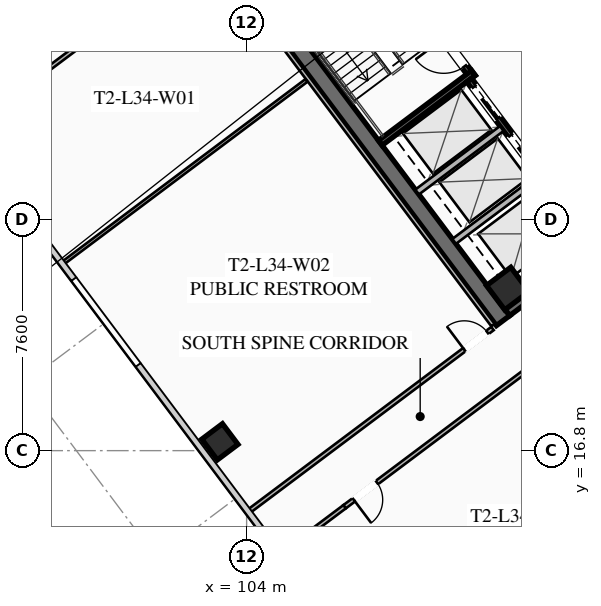
"""IFC4 building model, lengths in metres.
Left out: names, types, materials, properties, quantities, classifications, styles, units other than length and angle.
Written with IfcOpenShell. Run it as: python <this file> out.ifc"""

import sys

from ifc_helpers import new_model, si_unit, direction, frame, frame_2d, origin, origin_2d, place, context, subcontext, project, spatial, rectangle, hollow_rectangle, extrude, element, fill, save


model = new_model("IFC4")
c1 = context("Model", 3, precision=1e-05, world=origin(), true_north=direction((0.0, 1.0)))
c2 = subcontext(c1, "Body", "Model", "MODEL_VIEW")
j1 = project(units=[si_unit("LENGTHUNIT", "METRE"), si_unit("PLANEANGLEUNIT", "RADIAN")], contexts=[c1])
p1 = place(None, origin())
s1 = spatial("IfcSite", under=j1, at=p1, CompositionType="ELEMENT")
p2 = place(p1, origin())
s2 = spatial("IfcBuilding", under=s1, at=p2, CompositionType="ELEMENT")
p3 = place(p2, frame((0.0, 0.0, 128.6)))
s3 = spatial("IfcBuildingStorey", under=s2, at=p3, CompositionType="ELEMENT", Elevation=128.6)
p4 = place(p3, frame((112.436, 21.077, 0.0), z_axis=(0.0, 0.0, 1.0), x_axis=(-0.600005007985, 0.799996243986, 0.0)))
e1 = element("IfcWall", 1, at=p4, inside=s3, PredefinedType="SHEAR", context=c2, shape_type="SweptSolid", body=[
    extrude(rectangle(XDim=15.6, YDim=0.55, at=frame_2d((7.8, 0.0))), origin(), (0.0, 0.0, 1.0), 3.55),
])
p5 = place(p3, frame((124.539, 30.498, 0.0), z_axis=(0.0, 0.0, 1.0), x_axis=(-0.799998054672, -0.600002593761, 0.0)))
e2 = element("IfcWall", 2, at=p5, inside=s3, PredefinedType="SHEAR", context=c2, shape_type="SweptSolid", body=[
    extrude(rectangle(XDim=15.06, YDim=0.55, at=frame_2d((7.53, 0.0))), origin(), (0.0, 0.0, 1.0), 3.55),
])
p6 = place(p5, frame((9.23, 0.0, 0.0)))
e3 = element("IfcOpeningElement", 3, at=p6, cuts=e2, PredefinedType="OPENING", context=c2, shape_type="SweptSolid", body=[
    extrude(rectangle(XDim=1.25, YDim=2.25, at=frame_2d((0.625, 1.125))), frame((0.0, 0.285, 0.0), z_axis=(0.0, -1.0, 0.0), x_axis=(1.0, 0.0, 0.0)), (0.0, 0.0, 1.0), 0.57),
])
p7 = place(p5, frame((4.18, 0.0, 0.0)))
e4 = element("IfcOpeningElement", 4, at=p7, cuts=e2, PredefinedType="OPENING", context=c2, shape_type="SweptSolid", body=[
    extrude(rectangle(XDim=1.25, YDim=2.25, at=frame_2d((0.625, 1.125))), frame((0.0, 0.285, 0.0), z_axis=(0.0, -1.0, 0.0), x_axis=(1.0, 0.0, 0.0)), (0.0, 0.0, 1.0), 0.57),
])
p8 = place(p3, frame((112.59, 22.13, 0.0), z_axis=(0.0, 0.0, 1.0), x_axis=(0.799999996291, 0.600000004945, 0.0)))
e5 = element("IfcColumn", 5, at=p8, inside=s3, PredefinedType="COLUMN", context=c2, shape_type="SweptSolid", body=[
    extrude(hollow_rectangle(XDim=1.0, YDim=1.0, WallThickness=0.04, at=origin_2d()), origin(), (0.0, 0.0, 1.0), 3.37),
])
p9 = place(p3, frame((103.12, 17.09, 0.0), z_axis=(0.0, 0.0, 1.0), x_axis=(0.799999996291, 0.600000004945, 0.0)))
e6 = element("IfcColumn", 6, at=p9, inside=s3, PredefinedType="COLUMN", context=c2, shape_type="SweptSolid", body=[
    extrude(hollow_rectangle(XDim=0.85, YDim=0.85, WallThickness=0.035, at=origin_2d()), origin(), (0.0, 0.0, 1.0), 3.37),
])
p10 = place(p3, frame((111.44, 29.08, 0.0), z_axis=(0.0, 0.0, 1.0), x_axis=(-0.59999029481, 0.8000072788, 0.0)))
e7 = element("IfcWall", 7, at=p10, inside=s3, PredefinedType="SHEAR", context=c2, shape_type="SweptSolid", body=[
    extrude(rectangle(XDim=8.05, YDim=0.2, at=frame_2d((4.025, 0.0))), origin(), (0.0, 0.0, 1.0), 3.37),
])
p11 = place(p10, frame((0.45, 0.0, 0.0)))
e8 = element("IfcOpeningElement", 8, at=p11, cuts=e7, PredefinedType="OPENING", context=c2, shape_type="SweptSolid", body=[
    extrude(rectangle(XDim=1.15, YDim=2.2, at=frame_2d((0.575, 1.1))), frame((0.0, 0.11, 0.0), z_axis=(0.0, -1.0, 0.0), x_axis=(1.0, 0.0, 0.0)), (0.0, 0.0, 1.0), 0.22),
])
p12 = place(p3, frame((108.396, 26.922, 0.0), z_axis=(0.0, 0.0, 1.0), x_axis=(0.800015298837, 0.599979601008, 0.0)))
e9 = element("IfcWall", 9, at=p12, inside=s3, PredefinedType="SHEAR", context=c2, shape_type="SweptSolid", body=[
    extrude(rectangle(XDim=3.83, YDim=0.2, at=frame_2d((1.915, 0.0))), origin(), (0.0, 0.0, 1.0), 3.37),
])
p13 = place(p3, frame((117.998, 25.936, 0.0), z_axis=(0.0, 0.0, 1.0), x_axis=(-0.600002693989, 0.799997979501, 0.0)))
e10 = element("IfcWall", 10, at=p13, inside=s3, PredefinedType="SHEAR", context=c2, shape_type="SweptSolid", body=[
    extrude(rectangle(XDim=14.5, YDim=0.2, at=frame_2d((7.25, 0.0))), origin(), (0.0, 0.0, 1.0), 3.37),
])
p14 = place(p3, frame((115.19, 23.83, 0.0), z_axis=(0.0, 0.0, 1.0), x_axis=(-0.599993943644, 0.800004542231, 0.0)))
e11 = element("IfcWall", 11, at=p14, inside=s3, PredefinedType="SHEAR", context=c2, shape_type="SweptSolid", body=[
    extrude(rectangle(XDim=6.45, YDim=0.2, at=frame_2d((3.225, 0.0))), origin(), (0.0, 0.0, 1.0), 3.37),
])
p15 = place(p14, frame((4.875, 0.0, 0.0)))
e12 = element("IfcOpeningElement", 12, at=p15, cuts=e11, PredefinedType="OPENING", context=c2, shape_type="SweptSolid", body=[
    extrude(rectangle(XDim=1.3, YDim=2.25, at=frame_2d((0.65, 1.125))), frame((0.0, 0.11, 0.0), z_axis=(0.0, -1.0, 0.0), x_axis=(1.0, 0.0, 0.0)), (0.0, 0.0, 1.0), 0.22),
])
p16 = place(p14, frame((2.875, 0.0, 0.0)))
e13 = element("IfcOpeningElement", 13, at=p16, cuts=e11, PredefinedType="OPENING", context=c2, shape_type="SweptSolid", body=[
    extrude(rectangle(XDim=1.3, YDim=2.25, at=frame_2d((0.65, 1.125))), frame((0.0, 0.11, 0.0), z_axis=(0.0, -1.0, 0.0), x_axis=(1.0, 0.0, 0.0)), (0.0, 0.0, 1.0), 0.22),
])
p17 = place(p14, frame((0.675, 0.0, 0.0)))
e14 = element("IfcOpeningElement", 14, at=p17, cuts=e11, PredefinedType="OPENING", context=c2, shape_type="SweptSolid", body=[
    extrude(rectangle(XDim=1.3, YDim=2.25, at=frame_2d((0.65, 1.125))), frame((0.0, 0.11, 0.0), z_axis=(0.0, -1.0, 0.0), x_axis=(1.0, 0.0, 0.0)), (0.0, 0.0, 1.0), 0.22),
])
for number, where, z_axis, x_axis in (
    (15, (110.826, 23.682, 0.0), (0.0, 0.0, 1.0), (0.8, 0.6, 0.0)),
    (16, (109.608, 25.306, 0.0), (0.0, 0.0, 1.0), (0.8, 0.6, 0.0)),
):
    element("IfcWall", number, at=place(p3, frame(where, z_axis=z_axis, x_axis=x_axis)), inside=s3, PredefinedType="SOLIDWALL", context=c2, shape_type="SweptSolid", body=[
        extrude(rectangle(XDim=3.48, YDim=0.2, at=frame_2d((1.74, 0.0))), origin(), (0.0, 0.0, 1.0), 3.37),
    ])
p18 = place(p3, frame((132.262, 33.734, 0.0), z_axis=(0.0, 0.0, 1.0), x_axis=(-0.800003744006, -0.59999500796, 0.0)))
e17 = element("IfcWall", 17, at=p18, inside=s3, PredefinedType="PARTITIONING", context=c2, shape_type="SweptSolid", body=[
    extrude(rectangle(XDim=31.3, YDim=0.135, at=frame_2d((15.65, 0.0))), origin(), (0.0, 0.0, 1.0), 2.723),
])
p19 = place(p18, frame((29.97, 0.0, 0.0)))
e18 = element("IfcOpeningElement", 18, at=p19, cuts=e17, PredefinedType="OPENING", context=c2, shape_type="SweptSolid", body=[
    extrude(rectangle(XDim=0.95, YDim=2.05, at=frame_2d((0.475, 1.025))), frame((0.0, 0.077, 0.0), z_axis=(0.0, -1.0, 0.0), x_axis=(1.0, 0.0, 0.0)), (0.0, 0.0, 1.0), 0.155),
])
p20 = place(p18, frame((15.43, 0.0, 0.0)))
e19 = element("IfcOpeningElement", 19, at=p20, cuts=e17, PredefinedType="OPENING", context=c2, shape_type="SweptSolid", body=[
    extrude(rectangle(XDim=0.95, YDim=2.05, at=frame_2d((0.475, 1.025))), frame((0.0, 0.077, 0.0), z_axis=(0.0, -1.0, 0.0), x_axis=(1.0, 0.0, 0.0)), (0.0, 0.0, 1.0), 0.155),
])
p21 = place(p18, frame((11.146, 0.0, 0.0)))
e20 = element("IfcOpeningElement", 20, at=p21, cuts=e17, PredefinedType="OPENING", context=c2, shape_type="SweptSolid", body=[
    extrude(rectangle(XDim=0.95, YDim=2.05, at=frame_2d((0.475, 1.025))), frame((0.0, 0.077, 0.0), z_axis=(0.0, -1.0, 0.0), x_axis=(1.0, 0.0, 0.0)), (0.0, 0.0, 1.0), 0.155),
])
p22 = place(p18, frame((0.38, 0.0, 0.0)))
e21 = element("IfcOpeningElement", 21, at=p22, cuts=e17, PredefinedType="OPENING", context=c2, shape_type="SweptSolid", body=[
    extrude(rectangle(XDim=0.95, YDim=2.05, at=frame_2d((0.475, 1.025))), frame((0.0, 0.077, 0.0), z_axis=(0.0, -1.0, 0.0), x_axis=(1.0, 0.0, 0.0)), (0.0, 0.0, 1.0), 0.155),
])
p23 = place(p3, frame((105.118, 13.376, 0.0), z_axis=(0.0, 0.0, 1.0), x_axis=(0.799977721118, 0.600029704027, 0.0)))
e22 = element("IfcWall", 22, at=p23, inside=s3, PredefinedType="PARTITIONING", context=c2, shape_type="SweptSolid", body=[
    extrude(rectangle(XDim=2.63, YDim=0.135, at=frame_2d((1.315, 0.0))), origin(), (0.0, 0.0, 1.0), 2.723),
])
p24 = place(p3, frame((112.104, 20.928, 0.0), z_axis=(0.0, 0.0, 1.0), x_axis=(-0.599994940075, 0.800003794918, 0.0)))
e23 = element("IfcWall", 23, at=p24, inside=s3, PredefinedType="PARTITIONING", context=c2, shape_type="SweptSolid", body=[
    extrude(rectangle(XDim=15.44, YDim=0.135, at=frame_2d((7.72, 0.0))), origin(), (0.0, 0.0, 1.0), 2.723),
])
p25 = place(p3, frame((102.728, 33.296, 0.0), z_axis=(0.0, 0.0, 1.0), x_axis=(-0.800002918023, -0.599996109283, 0.0)))
e24 = element("IfcWall", 24, at=p25, inside=s3, PredefinedType="PARTITIONING", context=c2, shape_type="SweptSolid", body=[
    extrude(rectangle(XDim=10.04, YDim=0.135, at=frame_2d((5.02, 0.0))), origin(), (0.0, 0.0, 1.0), 2.723),
])
p26 = place(p25, frame((0.5, 0.0, 0.0)))
e25 = element("IfcOpeningElement", 25, at=p26, cuts=e24, PredefinedType="OPENING", context=c2, shape_type="SweptSolid", body=[
    extrude(rectangle(XDim=0.95, YDim=2.05, at=frame_2d((0.475, 1.025))), frame((0.0, 0.077, 0.0), z_axis=(0.0, -1.0, 0.0), x_axis=(1.0, 0.0, 0.0)), (0.0, 0.0, 1.0), 0.155),
])
p27 = place(p3, frame((104.056, 14.792, 0.0), z_axis=(0.0, 0.0, 1.0), x_axis=(0.800002918023, 0.599996109283, 0.0)))
e26 = element("IfcWall", 26, at=p27, inside=s3, PredefinedType="PARTITIONING", context=c2, shape_type="SweptSolid", body=[
    extrude(rectangle(XDim=10.04, YDim=0.135, at=frame_2d((5.02, 0.0))), origin(), (0.0, 0.0, 1.0), 2.723),
])
p28 = place(p27, frame((8.88, 0.0, 0.0)))
e27 = element("IfcOpeningElement", 27, at=p28, cuts=e26, PredefinedType="OPENING", context=c2, shape_type="SweptSolid", body=[
    extrude(rectangle(XDim=0.95, YDim=2.05, at=frame_2d((0.475, 1.025))), frame((0.0, 0.077, 0.0), z_axis=(0.0, -1.0, 0.0), x_axis=(1.0, 0.0, 0.0)), (0.0, 0.0, 1.0), 0.155),
])
p29 = place(p3, frame((97.936, 22.952, 0.0), z_axis=(0.0, 0.0, 1.0), x_axis=(0.799991245945, 0.600011671896, 0.0)))
e28 = element("IfcWall", 28, at=p29, inside=s3, PredefinedType="PARTITIONING", context=c2, shape_type="SweptSolid", body=[
    extrude(rectangle(XDim=10.04, YDim=0.11, at=frame_2d((5.02, 0.0))), origin(), (0.0, 0.0, 1.0), 2.723),
])
p30 = place(p11, origin())
e29 = element("IfcDoor", 29, at=p30, inside=s3, OperationType="SINGLE_SWING_RIGHT", PredefinedType="DOOR", context=c2, shape_type="SweptSolid", body=[
    extrude(rectangle(XDim=1.15, YDim=2.2, at=frame_2d((0.575, 1.1))), frame((0.0, 0.025, 0.0), z_axis=(0.0, -1.0, 0.0), x_axis=(1.0, 0.0, 0.0)), (0.0, 0.0, 1.0), 0.05),
])
fill(e8, e29)
p31 = place(p19, origin())
e30 = element("IfcDoor", 30, at=p31, inside=s3, OperationType="SINGLE_SWING_RIGHT", PredefinedType="DOOR", context=c2, shape_type="SweptSolid", body=[
    extrude(rectangle(XDim=0.95, YDim=2.05, at=frame_2d((0.475, 1.025))), frame((0.0, 0.025, 0.0), z_axis=(0.0, -1.0, 0.0), x_axis=(1.0, 0.0, 0.0)), (0.0, 0.0, 1.0), 0.05),
])
fill(e18, e30)
p32 = place(p28, origin())
e31 = element("IfcDoor", 31, at=p32, inside=s3, OperationType="SINGLE_SWING_LEFT", PredefinedType="DOOR", context=c2, shape_type="SweptSolid", body=[
    extrude(rectangle(XDim=0.95, YDim=2.05, at=frame_2d((0.475, 1.025))), frame((0.0, 0.025, 0.0), z_axis=(0.0, -1.0, 0.0), x_axis=(1.0, 0.0, 0.0)), (0.0, 0.0, 1.0), 0.05),
])
fill(e27, e31)
p33 = place(p15, origin())
e32 = element("IfcDoor", 32, at=p33, inside=s3, OperationType="SLIDING_TO_LEFT", PredefinedType="DOOR", context=c2, shape_type="SweptSolid", body=[
    extrude(rectangle(XDim=1.3, YDim=2.25, at=frame_2d((0.65, 1.125))), frame((0.0, 0.025, 0.0), z_axis=(0.0, -1.0, 0.0), x_axis=(1.0, 0.0, 0.0)), (0.0, 0.0, 1.0), 0.05),
])
fill(e12, e32)
p34 = place(p16, origin())
e33 = element("IfcDoor", 33, at=p34, inside=s3, OperationType="SLIDING_TO_LEFT", PredefinedType="DOOR", context=c2, shape_type="SweptSolid", body=[
    extrude(rectangle(XDim=1.3, YDim=2.25, at=frame_2d((0.65, 1.125))), frame((0.0, 0.025, 0.0), z_axis=(0.0, -1.0, 0.0), x_axis=(1.0, 0.0, 0.0)), (0.0, 0.0, 1.0), 0.05),
])
fill(e13, e33)
save(model, sys.argv[1])
